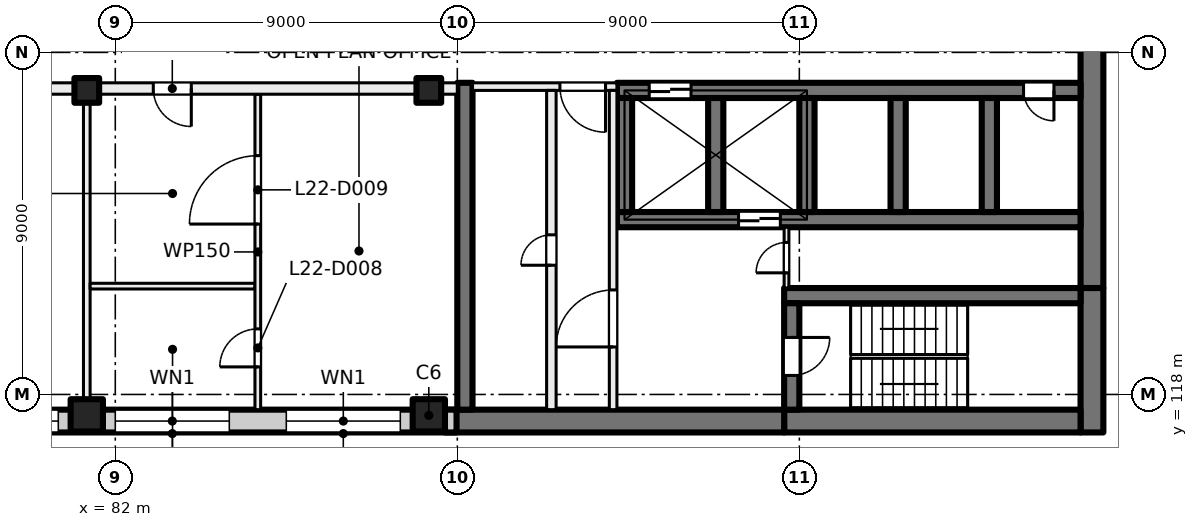
"""IFC4 building model, lengths in metres.
Left out: names, types, materials, properties, quantities, classifications, styles, units other than length and angle.
Written with IfcOpenShell. Run it as: python <this file> out.ifc"""

import sys

from ifc_helpers import new_model, si_unit, direction, frame, frame_2d, origin, origin_2d, place, context, subcontext, project, spatial, rectangle, extrude, element, fill, save


model = new_model("IFC4")
c1 = context("Model", 3, precision=1e-05, world=origin(), true_north=direction((0.0, 1.0)))
c2 = subcontext(c1, "Body", "Model", "MODEL_VIEW")
j1 = project(units=[si_unit("LENGTHUNIT", "METRE"), si_unit("PLANEANGLEUNIT", "RADIAN")], contexts=[c1])
p1 = place(None, origin())
s1 = spatial("IfcSite", under=j1, at=p1, CompositionType="ELEMENT")
p2 = place(p1, origin())
s2 = spatial("IfcBuilding", under=s1, at=p2, CompositionType="ELEMENT")
p3 = place(p2, frame((0.0, 0.0, 97.0)))
s3 = spatial("IfcBuildingStorey", under=s2, at=p3, CompositionType="ELEMENT", Elevation=97.0)
for number, where, z_axis, x_axis in (
    (1, (81.25, 126.0, 0.0), (0.0, 0.0, 1.0), (1.0, 0.0, 0.0)),
    (2, (90.25, 126.0, 0.0), (0.0, 0.0, 1.0), (1.0, 0.0, 0.0)),
):
    element("IfcColumn", number, at=place(p3, frame(where, z_axis=z_axis, x_axis=x_axis)), inside=s3, PredefinedType="COLUMN", context=c2, shape_type="SweptSolid", body=[
        extrude(rectangle(XDim=0.65, YDim=0.65, at=origin_2d()), origin(), (0.0, 0.0, 1.0), 4.0),
    ])
for number, where, z_axis, x_axis in (
    (3, (81.25, 117.45, 0.0), (0.0, 0.0, 1.0), (1.0, 0.0, 0.0)),
    (4, (90.25, 117.45, 0.0), (0.0, 0.0, 1.0), (1.0, 0.0, 0.0)),
):
    element("IfcColumn", number, at=place(p3, frame(where, z_axis=z_axis, x_axis=x_axis)), inside=s3, PredefinedType="COLUMN", context=c2, shape_type="SweptSolid", body=[
        extrude(rectangle(XDim=0.85, YDim=0.85, at=origin_2d()), origin(), (0.0, 0.0, 1.0), 4.0),
    ])
p4 = place(p3, frame((107.7, 135.2, 0.0), z_axis=(0.0, 0.0, 1.0), x_axis=(0.0, -1.0, 0.0)))
e5 = element("IfcWall", 5, at=p4, inside=s3, PredefinedType="SHEAR", context=c2, shape_type="SweptSolid", body=[
    extrude(rectangle(XDim=14.4, YDim=0.6, at=frame_2d((7.2, 0.0))), origin(), (0.0, 0.0, 1.0), 4.0),
])
p5 = place(p3, frame((107.7, 120.8, 0.0), z_axis=(0.0, 0.0, 1.0), x_axis=(0.0, -1.0, 0.0)))
e6 = element("IfcWall", 6, at=p5, inside=s3, PredefinedType="SHEAR", context=c2, shape_type="SweptSolid", body=[
    extrude(rectangle(XDim=3.8, YDim=0.6, at=frame_2d((1.9, 0.0))), origin(), (0.0, 0.0, 1.0), 4.0),
])
p6 = place(p3, frame((107.4, 117.3, 0.0), z_axis=(0.0, 0.0, 1.0), x_axis=(-1.0, 0.0, 0.0)))
e7 = element("IfcWall", 7, at=p6, inside=s3, PredefinedType="SHEAR", context=c2, shape_type="SweptSolid", body=[
    extrude(rectangle(XDim=7.8, YDim=0.6, at=frame_2d((3.9, 0.0))), origin(), (0.0, 0.0, 1.0), 4.0),
])
p7 = place(p3, frame((99.6, 117.3, 0.0), z_axis=(0.0, 0.0, 1.0), x_axis=(-1.0, 0.0, 0.0)))
e8 = element("IfcWall", 8, at=p7, inside=s3, PredefinedType="SHEAR", context=c2, shape_type="SweptSolid", body=[
    extrude(rectangle(XDim=8.925, YDim=0.6, at=frame_2d((4.462, 0.0))), origin(), (0.0, 0.0, 1.0), 4.0),
])
p8 = place(p3, frame((107.4, 120.6, 0.0), z_axis=(0.0, 0.0, 1.0), x_axis=(-1.0, 0.0, 0.0)))
e9 = element("IfcWall", 9, at=p8, inside=s3, PredefinedType="SHEAR", context=c2, shape_type="SweptSolid", body=[
    extrude(rectangle(XDim=7.8, YDim=0.4, at=frame_2d((3.9, 0.0))), origin(), (0.0, 0.0, 1.0), 4.0),
])
p9 = place(p3, frame((99.8, 120.4, 0.0), z_axis=(0.0, 0.0, 1.0), x_axis=(0.0, -1.0, 0.0)))
e10 = element("IfcWall", 10, at=p9, inside=s3, PredefinedType="SHEAR", context=c2, shape_type="SweptSolid", body=[
    extrude(rectangle(XDim=2.8, YDim=0.4, at=frame_2d((1.4, 0.0))), origin(), (0.0, 0.0, 1.0), 4.0),
])
p10 = place(p9, frame((0.9, 0.0, 0.0)))
e11 = element("IfcOpeningElement", 11, at=p10, cuts=e10, PredefinedType="OPENING", context=c2, shape_type="SweptSolid", body=[
    extrude(rectangle(XDim=1.0, YDim=2.1, at=frame_2d((0.5, 1.05))), frame((0.0, 0.21, 0.0), z_axis=(0.0, -1.0, 0.0), x_axis=(1.0, 0.0, 0.0)), (0.0, 0.0, 1.0), 0.42),
])
p11 = place(p3, frame((107.4, 126.0, 0.0), z_axis=(0.0, 0.0, 1.0), x_axis=(-1.0, 0.0, 0.0)))
e12 = element("IfcWall", 12, at=p11, inside=s3, PredefinedType="SHEAR", context=c2, shape_type="SweptSolid", body=[
    extrude(rectangle(XDim=12.2, YDim=0.4, at=frame_2d((6.1, 0.0))), origin(), (0.0, 0.0, 1.0), 4.0),
])
p12 = place(p11, frame((10.25, 0.0, 0.0)))
e13 = element("IfcOpeningElement", 13, at=p12, cuts=e12, PredefinedType="OPENING", context=c2, shape_type="SweptSolid", body=[
    extrude(rectangle(XDim=1.1, YDim=2.1, at=frame_2d((0.55, 1.05))), frame((0.0, 0.21, 0.0), z_axis=(0.0, -1.0, 0.0), x_axis=(1.0, 0.0, 0.0)), (0.0, 0.0, 1.0), 0.42),
])
p13 = place(p11, frame((0.7, 0.0, 0.0)))
e14 = element("IfcOpeningElement", 14, at=p13, cuts=e12, PredefinedType="OPENING", context=c2, shape_type="SweptSolid", body=[
    extrude(rectangle(XDim=0.8, YDim=2.1, at=frame_2d((0.4, 1.05))), frame((0.0, 0.21, 0.0), z_axis=(0.0, -1.0, 0.0), x_axis=(1.0, 0.0, 0.0)), (0.0, 0.0, 1.0), 0.42),
])
p14 = place(p3, frame((107.4, 122.6, 0.0), z_axis=(0.0, 0.0, 1.0), x_axis=(-1.0, 0.0, 0.0)))
e15 = element("IfcWall", 15, at=p14, inside=s3, PredefinedType="SHEAR", context=c2, shape_type="SweptSolid", body=[
    extrude(rectangle(XDim=12.2, YDim=0.4, at=frame_2d((6.1, 0.0))), origin(), (0.0, 0.0, 1.0), 4.0),
])
p15 = place(p14, frame((7.9, 0.0, 0.0)))
e16 = element("IfcOpeningElement", 16, at=p15, cuts=e15, PredefinedType="OPENING", context=c2, shape_type="SweptSolid", body=[
    extrude(rectangle(XDim=1.1, YDim=2.1, at=frame_2d((0.55, 1.05))), frame((0.0, 0.21, 0.0), z_axis=(0.0, -1.0, 0.0), x_axis=(1.0, 0.0, 0.0)), (0.0, 0.0, 1.0), 0.42),
])
for number, where, z_axis, x_axis in (
    (17, (105.0, 125.8, 0.0), (0.0, 0.0, 1.0), (0.0, -1.0, 0.0)),
    (18, (102.6, 125.8, 0.0), (0.0, 0.0, 1.0), (0.0, -1.0, 0.0)),
    (19, (100.2, 125.8, 0.0), (0.0, 0.0, 1.0), (0.0, -1.0, 0.0)),
    (20, (97.8, 125.8, 0.0), (0.0, 0.0, 1.0), (0.0, -1.0, 0.0)),
    (21, (95.4, 125.8, 0.0), (0.0, 0.0, 1.0), (0.0, -1.0, 0.0)),
):
    element("IfcWall", number, at=place(p3, frame(where, z_axis=z_axis, x_axis=x_axis)), inside=s3, PredefinedType="SHEAR", context=c2, shape_type="SweptSolid", body=[
        extrude(rectangle(XDim=3.0, YDim=0.4, at=frame_2d((1.5, 0.0))), origin(), (0.0, 0.0, 1.0), 4.0),
    ])
p16 = place(p3, frame((91.2, 126.2, 0.0), z_axis=(0.0, 0.0, 1.0), x_axis=(0.0, -1.0, 0.0)))
e22 = element("IfcWall", 22, at=p16, inside=s3, PredefinedType="SHEAR", context=c2, shape_type="SweptSolid", body=[
    extrude(rectangle(XDim=8.6, YDim=0.4, at=frame_2d((4.3, 0.0))), origin(), (0.0, 0.0, 1.0), 4.0),
])
p17 = place(p3, frame((90.98, 117.3, 0.0), z_axis=(0.0, 0.0, 1.0), x_axis=(-1.0, 0.0, 0.0)))
e23 = element("IfcWall", 23, at=p17, inside=s3, PredefinedType="SOLIDWALL", context=c2, shape_type="SweptSolid", body=[
    extrude(rectangle(XDim=33.745, YDim=0.6, at=frame_2d((16.873, 0.0))), origin(), (0.0, 0.0, 1.0), 3.625),
])
p18 = place(p17, frame((1.48, 0.0, 0.9)))
e24 = element("IfcOpeningElement", 24, at=p18, cuts=e23, PredefinedType="OPENING", context=c2, shape_type="SweptSolid", body=[
    extrude(rectangle(XDim=3.0, YDim=2.4, at=frame_2d((1.5, 1.2))), frame((0.0, 0.31, 0.0), z_axis=(0.0, -1.0, 0.0), x_axis=(1.0, 0.0, 0.0)), (0.0, 0.0, 1.0), 0.62),
])
p19 = place(p17, frame((5.98, 0.0, 0.9)))
e25 = element("IfcOpeningElement", 25, at=p19, cuts=e23, PredefinedType="OPENING", context=c2, shape_type="SweptSolid", body=[
    extrude(rectangle(XDim=3.0, YDim=2.4, at=frame_2d((1.5, 1.2))), frame((0.0, 0.31, 0.0), z_axis=(0.0, -1.0, 0.0), x_axis=(1.0, 0.0, 0.0)), (0.0, 0.0, 1.0), 0.62),
])
p20 = place(p17, frame((10.48, 0.0, 0.9)))
e26 = element("IfcOpeningElement", 26, at=p20, cuts=e23, PredefinedType="OPENING", context=c2, shape_type="SweptSolid", body=[
    extrude(rectangle(XDim=3.0, YDim=2.4, at=frame_2d((1.5, 1.2))), frame((0.0, 0.31, 0.0), z_axis=(0.0, -1.0, 0.0), x_axis=(1.0, 0.0, 0.0)), (0.0, 0.0, 1.0), 0.62),
])
p21 = place(p17, frame((14.98, 0.0, 0.9)))
e27 = element("IfcOpeningElement", 27, at=p21, cuts=e23, PredefinedType="OPENING", context=c2, shape_type="SweptSolid", body=[
    extrude(rectangle(XDim=3.0, YDim=2.4, at=frame_2d((1.5, 1.2))), frame((0.0, 0.31, 0.0), z_axis=(0.0, -1.0, 0.0), x_axis=(1.0, 0.0, 0.0)), (0.0, 0.0, 1.0), 0.62),
])
p22 = place(p17, frame((19.48, 0.0, 0.9)))
e28 = element("IfcOpeningElement", 28, at=p22, cuts=e23, PredefinedType="OPENING", context=c2, shape_type="SweptSolid", body=[
    extrude(rectangle(XDim=3.0, YDim=2.4, at=frame_2d((1.5, 1.2))), frame((0.0, 0.31, 0.0), z_axis=(0.0, -1.0, 0.0), x_axis=(1.0, 0.0, 0.0)), (0.0, 0.0, 1.0), 0.62),
])
p23 = place(p17, frame((23.98, 0.0, 0.9)))
e29 = element("IfcOpeningElement", 29, at=p23, cuts=e23, PredefinedType="OPENING", context=c2, shape_type="SweptSolid", body=[
    extrude(rectangle(XDim=3.0, YDim=2.4, at=frame_2d((1.5, 1.2))), frame((0.0, 0.31, 0.0), z_axis=(0.0, -1.0, 0.0), x_axis=(1.0, 0.0, 0.0)), (0.0, 0.0, 1.0), 0.62),
])
p24 = place(p17, frame((28.48, 0.0, 0.9)))
e30 = element("IfcOpeningElement", 30, at=p24, cuts=e23, PredefinedType="OPENING", context=c2, shape_type="SweptSolid", body=[
    extrude(rectangle(XDim=3.0, YDim=2.4, at=frame_2d((1.5, 1.2))), frame((0.0, 0.31, 0.0), z_axis=(0.0, -1.0, 0.0), x_axis=(1.0, 0.0, 0.0)), (0.0, 0.0, 1.0), 0.62),
])
p25 = place(p3, frame((95.2, 126.1, 0.0), z_axis=(0.0, 0.0, 1.0), x_axis=(-1.0, 0.0, 0.0)))
e31 = element("IfcWall", 31, at=p25, inside=s3, PredefinedType="PARTITIONING", context=c2, shape_type="SweptSolid", body=[
    extrude(rectangle(XDim=3.8, YDim=0.2, at=frame_2d((1.9, 0.0))), origin(), (0.0, 0.0, 1.0), 3.625),
])
p26 = place(p25, frame((0.3, 0.0, 0.0)))
e32 = element("IfcOpeningElement", 32, at=p26, cuts=e31, PredefinedType="OPENING", context=c2, shape_type="SweptSolid", body=[
    extrude(rectangle(XDim=1.2, YDim=2.1, at=frame_2d((0.6, 1.05))), frame((0.0, 0.11, 0.0), z_axis=(0.0, -1.0, 0.0), x_axis=(1.0, 0.0, 0.0)), (0.0, 0.0, 1.0), 0.22),
])
p27 = place(p3, frame((95.1, 117.6, 0.0), z_axis=(0.0, 0.0, 1.0), x_axis=(0.0, 1.0, 0.0)))
e33 = element("IfcWall", 33, at=p27, inside=s3, PredefinedType="PARTITIONING", context=c2, shape_type="SweptSolid", body=[
    extrude(rectangle(XDim=8.4, YDim=0.2, at=frame_2d((4.2, 0.0))), origin(), (0.0, 0.0, 1.0), 3.625),
])
p28 = place(p27, frame((1.65, 0.0, 0.0)))
e34 = element("IfcOpeningElement", 34, at=p28, cuts=e33, PredefinedType="OPENING", context=c2, shape_type="SweptSolid", body=[
    extrude(rectangle(XDim=1.5, YDim=2.1, at=frame_2d((0.75, 1.05))), frame((0.0, 0.11, 0.0), z_axis=(0.0, -1.0, 0.0), x_axis=(1.0, 0.0, 0.0)), (0.0, 0.0, 1.0), 0.22),
])
p29 = place(p3, frame((93.475, 117.6, 0.0), z_axis=(0.0, 0.0, 1.0), x_axis=(0.0, 1.0, 0.0)))
e35 = element("IfcWall", 35, at=p29, inside=s3, PredefinedType="PARTITIONING", context=c2, shape_type="SweptSolid", body=[
    extrude(rectangle(XDim=8.4, YDim=0.25, at=frame_2d((4.2, 0.0))), origin(), (0.0, 0.0, 1.0), 3.625),
])
p30 = place(p29, frame((3.8, 0.0, 0.0)))
e36 = element("IfcOpeningElement", 36, at=p30, cuts=e35, PredefinedType="OPENING", context=c2, shape_type="SweptSolid", body=[
    extrude(rectangle(XDim=0.8, YDim=2.1, at=frame_2d((0.4, 1.05))), frame((0.0, 0.135, 0.0), z_axis=(0.0, -1.0, 0.0), x_axis=(1.0, 0.0, 0.0)), (0.0, 0.0, 1.0), 0.27),
])
p31 = place(p3, frame((99.663, 120.8, 0.0), z_axis=(0.0, 0.0, 1.0), x_axis=(0.0, 1.0, 0.0)))
e37 = element("IfcWall", 37, at=p31, inside=s3, PredefinedType="PARTITIONING", context=c2, shape_type="SweptSolid", body=[
    extrude(rectangle(XDim=1.6, YDim=0.125, at=frame_2d((0.8, 0.0))), origin(), (0.0, 0.0, 1.0), 3.625),
])
p32 = place(p31, frame((0.4, 0.0, 0.0)))
e38 = element("IfcOpeningElement", 38, at=p32, cuts=e37, PredefinedType="OPENING", context=c2, shape_type="SweptSolid", body=[
    extrude(rectangle(XDim=0.8, YDim=2.1, at=frame_2d((0.4, 1.05))), frame((0.0, 0.073, 0.0), z_axis=(0.0, -1.0, 0.0), x_axis=(1.0, 0.0, 0.0)), (0.0, 0.0, 1.0), 0.145),
])
p33 = place(p3, frame((81.25, 117.6, 0.0), z_axis=(0.0, 0.0, 1.0), x_axis=(0.0, 1.0, 0.0)))
e39 = element("IfcWall", 39, at=p33, inside=s3, PredefinedType="PARTITIONING", context=c2, shape_type="SweptSolid", body=[
    extrude(rectangle(XDim=8.3, YDim=0.175, at=frame_2d((4.15, 0.0))), origin(), (0.0, 0.0, 1.0), 3.625),
])
p34 = place(p3, frame((81.338, 120.85, 0.0), z_axis=(0.0, 0.0, 1.0), x_axis=(1.0, 0.0, 0.0)))
e40 = element("IfcWall", 40, at=p34, inside=s3, PredefinedType="PARTITIONING", context=c2, shape_type="SweptSolid", body=[
    extrude(rectangle(XDim=4.337, YDim=0.15, at=frame_2d((2.168, 0.0))), origin(), (0.0, 0.0, 1.0), 3.625),
])
p35 = place(p3, frame((85.75, 117.6, 0.0), z_axis=(0.0, 0.0, 1.0), x_axis=(0.0, 1.0, 0.0)))
e41 = element("IfcWall", 41, at=p35, inside=s3, PredefinedType="PARTITIONING", context=c2, shape_type="SweptSolid", body=[
    extrude(rectangle(XDim=8.3, YDim=0.15, at=frame_2d((4.15, 0.0))), origin(), (0.0, 0.0, 1.0), 3.625),
])
p36 = place(p35, frame((1.125, 0.0, 0.0)))
e42 = element("IfcOpeningElement", 42, at=p36, cuts=e41, PredefinedType="OPENING", context=c2, shape_type="SweptSolid", body=[
    extrude(rectangle(XDim=1.0, YDim=2.1, at=frame_2d((0.5, 1.05))), frame((0.0, 0.085, 0.0), z_axis=(0.0, -1.0, 0.0), x_axis=(1.0, 0.0, 0.0)), (0.0, 0.0, 1.0), 0.17),
])
p37 = place(p35, frame((4.884, 0.0, 0.0)))
e43 = element("IfcOpeningElement", 43, at=p37, cuts=e41, PredefinedType="OPENING", context=c2, shape_type="SweptSolid", body=[
    extrude(rectangle(XDim=1.8, YDim=2.1, at=frame_2d((0.9, 1.05))), frame((0.0, 0.085, 0.0), z_axis=(0.0, -1.0, 0.0), x_axis=(1.0, 0.0, 0.0)), (0.0, 0.0, 1.0), 0.17),
])
p38 = place(p3, frame((91.0, 126.05, 0.0), z_axis=(0.0, 0.0, 1.0), x_axis=(-1.0, 0.0, 0.0)))
e44 = element("IfcWall", 44, at=p38, inside=s3, PredefinedType="PARTITIONING", context=c2, shape_type="SweptSolid", body=[
    extrude(rectangle(XDim=43.785, YDim=0.3, at=frame_2d((21.893, 0.0))), origin(), (0.0, 0.0, 1.0), 3.625),
])
p39 = place(p38, frame((7.0, 0.0, 0.0)))
e45 = element("IfcOpeningElement", 45, at=p39, cuts=e44, PredefinedType="OPENING", context=c2, shape_type="SweptSolid", body=[
    extrude(rectangle(XDim=1.0, YDim=2.1, at=frame_2d((0.5, 1.05))), frame((0.0, 0.16, 0.0), z_axis=(0.0, -1.0, 0.0), x_axis=(1.0, 0.0, 0.0)), (0.0, 0.0, 1.0), 0.32),
])
p40 = place(p38, frame((15.6, 0.0, 0.0)))
e46 = element("IfcOpeningElement", 46, at=p40, cuts=e44, PredefinedType="OPENING", context=c2, shape_type="SweptSolid", body=[
    extrude(rectangle(XDim=1.8, YDim=2.1, at=frame_2d((0.9, 1.05))), frame((0.0, 0.16, 0.0), z_axis=(0.0, -1.0, 0.0), x_axis=(1.0, 0.0, 0.0)), (0.0, 0.0, 1.0), 0.32),
])
p41 = place(p38, frame((34.0, 0.0, 0.0)))
e47 = element("IfcOpeningElement", 47, at=p41, cuts=e44, PredefinedType="OPENING", context=c2, shape_type="SweptSolid", body=[
    extrude(rectangle(XDim=1.0, YDim=2.1, at=frame_2d((0.5, 1.05))), frame((0.0, 0.16, 0.0), z_axis=(0.0, -1.0, 0.0), x_axis=(1.0, 0.0, 0.0)), (0.0, 0.0, 1.0), 0.32),
])
p42 = place(p38, frame((39.296, 0.0, 0.0)))
e48 = element("IfcOpeningElement", 48, at=p42, cuts=e44, PredefinedType="OPENING", context=c2, shape_type="SweptSolid", body=[
    extrude(rectangle(XDim=1.8, YDim=2.1, at=frame_2d((0.9, 1.05))), frame((0.0, 0.16, 0.0), z_axis=(0.0, -1.0, 0.0), x_axis=(1.0, 0.0, 0.0)), (0.0, 0.0, 1.0), 0.32),
])
p43 = place(p18, origin())
e49 = element("IfcWindow", 49, at=p43, inside=s3, PartitioningType="SINGLE_PANEL", PredefinedType="WINDOW", context=c2, shape_type="SweptSolid", body=[
    extrude(rectangle(XDim=3.0, YDim=2.4, at=frame_2d((1.5, 1.2))), frame((0.0, 0.03, 0.0), z_axis=(0.0, -1.0, 0.0), x_axis=(1.0, 0.0, 0.0)), (0.0, 0.0, 1.0), 0.06),
])
fill(e24, e49)
p44 = place(p19, origin())
e50 = element("IfcWindow", 50, at=p44, inside=s3, PartitioningType="SINGLE_PANEL", PredefinedType="WINDOW", context=c2, shape_type="SweptSolid", body=[
    extrude(rectangle(XDim=3.0, YDim=2.4, at=frame_2d((1.5, 1.2))), frame((0.0, 0.03, 0.0), z_axis=(0.0, -1.0, 0.0), x_axis=(1.0, 0.0, 0.0)), (0.0, 0.0, 1.0), 0.06),
])
fill(e25, e50)
p45 = place(p20, origin())
e51 = element("IfcWindow", 51, at=p45, inside=s3, PartitioningType="SINGLE_PANEL", PredefinedType="WINDOW", context=c2, shape_type="SweptSolid", body=[
    extrude(rectangle(XDim=3.0, YDim=2.4, at=frame_2d((1.5, 1.2))), frame((0.0, 0.03, 0.0), z_axis=(0.0, -1.0, 0.0), x_axis=(1.0, 0.0, 0.0)), (0.0, 0.0, 1.0), 0.06),
])
fill(e26, e51)
p46 = place(p12, origin())
e52 = element("IfcDoor", 52, at=p46, inside=s3, OperationType="DOUBLE_DOOR_SLIDING", PredefinedType="DOOR", context=c2, shape_type="SweptSolid", body=[
    extrude(rectangle(XDim=1.1, YDim=2.1, at=frame_2d((0.55, 1.05))), frame((0.0, 0.025, 0.0), z_axis=(0.0, -1.0, 0.0), x_axis=(1.0, 0.0, 0.0)), (0.0, 0.0, 1.0), 0.05),
])
fill(e13, e52)
p47 = place(p13, origin())
e53 = element("IfcDoor", 53, at=p47, inside=s3, OperationType="SINGLE_SWING_LEFT", PredefinedType="DOOR", context=c2, shape_type="SweptSolid", body=[
    extrude(rectangle(XDim=0.8, YDim=2.1, at=frame_2d((0.4, 1.05))), frame((0.0, 0.025, 0.0), z_axis=(0.0, -1.0, 0.0), x_axis=(1.0, 0.0, 0.0)), (0.0, 0.0, 1.0), 0.05),
])
fill(e14, e53)
p48 = place(p26, origin())
e54 = element("IfcDoor", 54, at=p48, inside=s3, OperationType="DOUBLE_DOOR_SINGLE_SWING", PredefinedType="DOOR", context=c2, shape_type="SweptSolid", body=[
    extrude(rectangle(XDim=1.2, YDim=2.1, at=frame_2d((0.6, 1.05))), frame((0.0, 0.025, 0.0), z_axis=(0.0, -1.0, 0.0), x_axis=(1.0, 0.0, 0.0)), (0.0, 0.0, 1.0), 0.05),
])
fill(e32, e54)
p49 = place(p28, origin())
e55 = element("IfcDoor", 55, at=p49, inside=s3, OperationType="DOUBLE_DOOR_SINGLE_SWING", PredefinedType="DOOR", context=c2, shape_type="SweptSolid", body=[
    extrude(rectangle(XDim=1.5, YDim=2.1, at=frame_2d((0.75, 1.05))), frame((0.0, 0.025, 0.0), z_axis=(0.0, -1.0, 0.0), x_axis=(1.0, 0.0, 0.0)), (0.0, 0.0, 1.0), 0.05),
])
fill(e34, e55)
p50 = place(p10, origin())
e56 = element("IfcDoor", 56, at=p50, inside=s3, OperationType="SINGLE_SWING_LEFT", PredefinedType="DOOR", context=c2, shape_type="SweptSolid", body=[
    extrude(rectangle(XDim=1.0, YDim=2.1, at=frame_2d((0.5, 1.05))), frame((0.0, 0.025, 0.0), z_axis=(0.0, -1.0, 0.0), x_axis=(1.0, 0.0, 0.0)), (0.0, 0.0, 1.0), 0.05),
])
fill(e11, e56)
p51 = place(p32, origin())
e57 = element("IfcDoor", 57, at=p51, inside=s3, OperationType="SINGLE_SWING_RIGHT", PredefinedType="DOOR", context=c2, shape_type="SweptSolid", body=[
    extrude(rectangle(XDim=0.8, YDim=2.1, at=frame_2d((0.4, 1.05))), frame((0.0, 0.025, 0.0), z_axis=(0.0, -1.0, 0.0), x_axis=(1.0, 0.0, 0.0)), (0.0, 0.0, 1.0), 0.05),
])
fill(e38, e57)
p52 = place(p30, origin())
e58 = element("IfcDoor", 58, at=p52, inside=s3, OperationType="SINGLE_SWING_LEFT", PredefinedType="DOOR", context=c2, shape_type="SweptSolid", body=[
    extrude(rectangle(XDim=0.8, YDim=2.1, at=frame_2d((0.4, 1.05))), frame((0.0, 0.025, 0.0), z_axis=(0.0, -1.0, 0.0), x_axis=(1.0, 0.0, 0.0)), (0.0, 0.0, 1.0), 0.05),
])
fill(e36, e58)
p53 = place(p15, origin())
e59 = element("IfcDoor", 59, at=p53, inside=s3, OperationType="DOUBLE_DOOR_SLIDING", PredefinedType="DOOR", context=c2, shape_type="SweptSolid", body=[
    extrude(rectangle(XDim=1.1, YDim=2.1, at=frame_2d((0.55, 1.05))), frame((0.0, 0.025, 0.0), z_axis=(0.0, -1.0, 0.0), x_axis=(1.0, 0.0, 0.0)), (0.0, 0.0, 1.0), 0.05),
])
fill(e16, e59)
p54 = place(p39, origin())
e60 = element("IfcDoor", 60, at=p54, inside=s3, OperationType="SINGLE_SWING_RIGHT", PredefinedType="DOOR", context=c2, shape_type="SweptSolid", body=[
    extrude(rectangle(XDim=1.0, YDim=2.1, at=frame_2d((0.5, 1.05))), frame((0.0, 0.025, 0.0), z_axis=(0.0, -1.0, 0.0), x_axis=(1.0, 0.0, 0.0)), (0.0, 0.0, 1.0), 0.05),
])
fill(e45, e60)
p55 = place(p36, origin())
e61 = element("IfcDoor", 61, at=p55, inside=s3, OperationType="SINGLE_SWING_RIGHT", PredefinedType="DOOR", context=c2, shape_type="SweptSolid", body=[
    extrude(rectangle(XDim=1.0, YDim=2.1, at=frame_2d((0.5, 1.05))), frame((0.0, 0.025, 0.0), z_axis=(0.0, -1.0, 0.0), x_axis=(1.0, 0.0, 0.0)), (0.0, 0.0, 1.0), 0.05),
])
fill(e42, e61)
p56 = place(p37, origin())
e62 = element("IfcDoor", 62, at=p56, inside=s3, OperationType="DOUBLE_DOOR_SINGLE_SWING", PredefinedType="DOOR", context=c2, shape_type="SweptSolid", body=[
    extrude(rectangle(XDim=1.8, YDim=2.1, at=frame_2d((0.9, 1.05))), frame((0.0, 0.025, 0.0), z_axis=(0.0, -1.0, 0.0), x_axis=(1.0, 0.0, 0.0)), (0.0, 0.0, 1.0), 0.05),
])
fill(e43, e62)
save(model, sys.argv[1])
